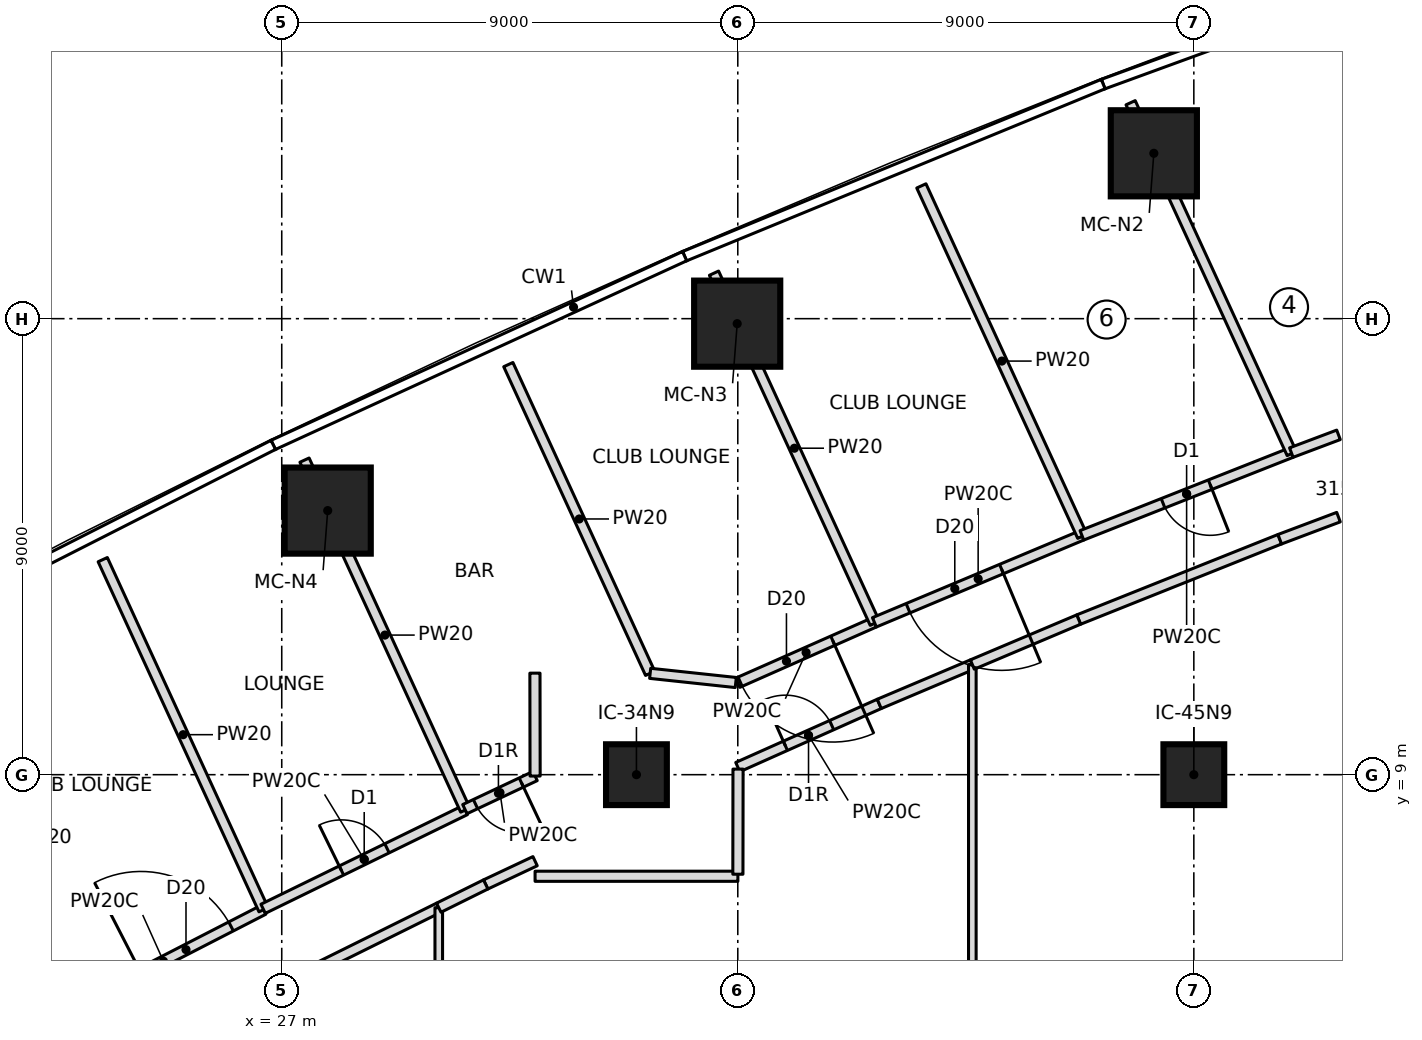
"""IFC4 building model, lengths in metres.
Left out: names, types, materials, properties, quantities, classifications, styles, units other than length and angle.
Written with IfcOpenShell. Run it as: python <this file> out.ifc"""

import sys

from ifc_helpers import new_model, si_unit, direction, frame, frame_2d, origin, origin_2d, place, context, subcontext, project, spatial, rectangle, extrude, element, fill, save


model = new_model("IFC4")
c1 = context("Model", 3, precision=1e-05, world=origin(), true_north=direction((0.0, 1.0)))
c2 = subcontext(c1, "Body", "Model", "MODEL_VIEW")
j1 = project(units=[si_unit("LENGTHUNIT", "METRE"), si_unit("PLANEANGLEUNIT", "RADIAN")], contexts=[c1])
p1 = place(None, origin())
s1 = spatial("IfcSite", under=j1, at=p1, CompositionType="ELEMENT")
p2 = place(p1, origin())
s2 = spatial("IfcBuilding", under=s1, at=p2, CompositionType="ELEMENT")
p3 = place(p2, frame((0.0, 0.0, 88.45)))
s3 = spatial("IfcBuildingStorey", under=s2, at=p3, CompositionType="ELEMENT", Elevation=88.45)
for number, where, z_axis, x_axis in (
    (1, (44.211, 21.264, 0.0), (0.0, 0.0, 1.0), (1.0, 0.0, 0.0)),
    (2, (35.988, 17.902, 0.0), (0.0, 0.0, 1.0), (1.0, 0.0, 0.0)),
    (3, (27.907, 14.212, 0.0), (0.0, 0.0, 1.0), (1.0, 0.0, 0.0)),
):
    element("IfcColumn", number, at=place(p3, frame(where, z_axis=z_axis, x_axis=x_axis)), inside=s3, PredefinedType="COLUMN", context=c2, shape_type="SweptSolid", body=[
        extrude(rectangle(XDim=1.7, YDim=1.7, at=origin_2d()), origin(), (0.0, 0.0, 1.0), 3.55),
    ])
for number, where, z_axis, x_axis in (
    (4, (34.0, 9.0, 0.0), (0.0, 0.0, 1.0), (1.0, 0.0, 0.0)),
    (5, (45.0, 9.0, 0.0), (0.0, 0.0, 1.0), (1.0, 0.0, 0.0)),
):
    element("IfcColumn", number, at=place(p3, frame(where, z_axis=z_axis, x_axis=x_axis)), inside=s3, PredefinedType="COLUMN", context=c2, shape_type="SweptSolid", body=[
        extrude(rectangle(XDim=1.2, YDim=1.2, at=origin_2d()), origin(), (0.0, 0.0, 1.0), 3.55),
    ])
p4 = place(p3, frame((22.699, 4.284, 0.0), z_axis=(0.0, 0.0, 1.0), x_axis=(-0.417413534969, 0.908716644959, 0.0)))
e6 = element("IfcWall", 6, at=p4, inside=s3, PredefinedType="PARTITIONING", context=c2, shape_type="SweptSolid", body=[
    extrude(rectangle(XDim=7.609, YDim=0.2, at=frame_2d((3.805, 0.0))), origin(), (0.0, 0.0, 1.0), 3.25),
])
p5 = place(p3, frame((22.69, 4.302, 0.0), z_axis=(0.0, 0.0, 1.0), x_axis=(0.889236075961, 0.457448577667, 0.0)))
e7 = element("IfcWall", 7, at=p5, inside=s3, PredefinedType="PARTITIONING", context=c2, shape_type="SweptSolid", body=[
    extrude(rectangle(XDim=4.443, YDim=0.2, at=frame_2d((2.222, 0.0))), origin(), (0.0, 0.0, 1.0), 3.25),
])
p6 = place(p5, frame((1.721, 0.0, 0.0)))
e8 = element("IfcOpeningElement", 8, at=p6, cuts=e7, PredefinedType="OPENING", context=c2, shape_type="SweptSolid", body=[
    extrude(rectangle(XDim=2.0, YDim=2.4, at=frame_2d((1.0, 1.2))), frame((0.0, 0.11, 0.0), z_axis=(0.0, -1.0, 0.0), x_axis=(1.0, 0.0, 0.0)), (0.0, 0.0, 1.0), 0.22),
])
p7 = place(p3, frame((26.641, 6.335, 0.0), z_axis=(0.0, 0.0, 1.0), x_axis=(-0.417455028008, 0.908697584233, 0.0)))
e9 = element("IfcWall", 9, at=p7, inside=s3, PredefinedType="PARTITIONING", context=c2, shape_type="SweptSolid", body=[
    extrude(rectangle(XDim=7.603, YDim=0.2, at=frame_2d((3.802, 0.0))), origin(), (0.0, 0.0, 1.0), 3.25),
])
p8 = place(p3, frame((26.633, 6.353, 0.0), z_axis=(0.0, 0.0, 1.0), x_axis=(0.898502457097, 0.438968489291, 0.0)))
e10 = element("IfcWall", 10, at=p8, inside=s3, PredefinedType="PARTITIONING", context=c2, shape_type="SweptSolid", body=[
    extrude(rectangle(XDim=4.44, YDim=0.2, at=frame_2d((2.22, 0.0))), origin(), (0.0, 0.0, 1.0), 3.25),
])
p9 = place(p8, frame((1.72, 0.0, 0.0)))
e11 = element("IfcOpeningElement", 11, at=p9, cuts=e10, PredefinedType="OPENING", context=c2, shape_type="SweptSolid", body=[
    extrude(rectangle(XDim=1.0, YDim=2.1, at=frame_2d((0.5, 1.05))), frame((0.0, 0.11, 0.0), z_axis=(0.0, -1.0, 0.0), x_axis=(1.0, 0.0, 0.0)), (0.0, 0.0, 1.0), 0.22),
])
p10 = place(p3, frame((30.622, 8.302, 0.0), z_axis=(0.0, 0.0, 1.0), x_axis=(-0.417429919618, 0.90870911859, 0.0)))
e12 = element("IfcWall", 12, at=p10, inside=s3, PredefinedType="PARTITIONING", context=c2, shape_type="SweptSolid", body=[
    extrude(rectangle(XDim=7.6, YDim=0.2, at=frame_2d((3.8, 0.0))), origin(), (0.0, 0.0, 1.0), 3.25),
])
p11 = place(p3, frame((32.0, 8.973, 0.0), z_axis=(0.0, 0.0, 1.0), x_axis=(-0.904695891996, -0.42605791039, 0.0)))
e13 = element("IfcWall", 13, at=p11, inside=s3, PredefinedType="PARTITIONING", context=c2, shape_type="SweptSolid", body=[
    extrude(rectangle(XDim=1.532, YDim=0.2, at=frame_2d((0.766, 0.0))), origin(), (0.0, 0.0, 1.0), 3.25),
])
p12 = place(p11, frame((0.3, 0.0, 0.0)))
e14 = element("IfcOpeningElement", 14, at=p12, cuts=e13, PredefinedType="OPENING", context=c2, shape_type="SweptSolid", body=[
    extrude(rectangle(XDim=1.0, YDim=2.1, at=frame_2d((0.5, 1.05))), frame((0.0, 0.11, 0.0), z_axis=(0.0, -1.0, 0.0), x_axis=(1.0, 0.0, 0.0)), (0.0, 0.0, 1.0), 0.22),
])
p13 = place(p3, frame((34.271, 11.0, 0.0), z_axis=(0.0, 0.0, 1.0), x_axis=(-0.417420546123, 0.908713424394, 0.0)))
e15 = element("IfcWall", 15, at=p13, inside=s3, PredefinedType="PARTITIONING", context=c2, shape_type="SweptSolid", body=[
    extrude(rectangle(XDim=6.706, YDim=0.2, at=frame_2d((3.353, 0.0))), origin(), (0.0, 0.0, 1.0), 3.25),
])
p14 = place(p3, frame((38.696, 12.007, 0.0), z_axis=(0.0, 0.0, 1.0), x_axis=(-0.914578343518, -0.404408770389, 0.0)))
e16 = element("IfcWall", 16, at=p14, inside=s3, PredefinedType="PARTITIONING", context=c2, shape_type="SweptSolid", body=[
    extrude(rectangle(XDim=2.948, YDim=0.2, at=frame_2d((1.474, 0.0))), origin(), (0.0, 0.0, 1.0), 3.25),
])
p15 = place(p14, frame((0.898, 0.0, 0.0)))
e17 = element("IfcOpeningElement", 17, at=p15, cuts=e16, PredefinedType="OPENING", context=c2, shape_type="SweptSolid", body=[
    extrude(rectangle(XDim=2.0, YDim=2.4, at=frame_2d((1.0, 1.2))), frame((0.0, 0.11, 0.0), z_axis=(0.0, -1.0, 0.0), x_axis=(1.0, 0.0, 0.0)), (0.0, 0.0, 1.0), 0.22),
])
p16 = place(p3, frame((38.704, 11.989, 0.0), z_axis=(0.0, 0.0, 1.0), x_axis=(-0.417416334044, 0.908715359215, 0.0)))
e18 = element("IfcWall", 18, at=p16, inside=s3, PredefinedType="PARTITIONING", context=c2, shape_type="SweptSolid", body=[
    extrude(rectangle(XDim=7.604, YDim=0.2, at=frame_2d((3.802, 0.0))), origin(), (0.0, 0.0, 1.0), 3.25),
])
p17 = place(p3, frame((42.791, 13.724, 0.0), z_axis=(0.0, 0.0, 1.0), x_axis=(-0.922230433067, -0.386640696675, 0.0)))
e19 = element("IfcWall", 19, at=p17, inside=s3, PredefinedType="PARTITIONING", context=c2, shape_type="SweptSolid", body=[
    extrude(rectangle(XDim=4.44, YDim=0.2, at=frame_2d((2.22, 0.0))), origin(), (0.0, 0.0, 1.0), 3.25),
])
p18 = place(p17, frame((1.72, 0.0, 0.0)))
e20 = element("IfcOpeningElement", 20, at=p18, cuts=e19, PredefinedType="OPENING", context=c2, shape_type="SweptSolid", body=[
    extrude(rectangle(XDim=2.0, YDim=2.4, at=frame_2d((1.0, 1.2))), frame((0.0, 0.11, 0.0), z_axis=(0.0, -1.0, 0.0), x_axis=(1.0, 0.0, 0.0)), (0.0, 0.0, 1.0), 0.22),
])
p19 = place(p3, frame((42.799, 13.705, 0.0), z_axis=(0.0, 0.0, 1.0), x_axis=(-0.417427858403, 0.908710065438, 0.0)))
e21 = element("IfcWall", 21, at=p19, inside=s3, PredefinedType="PARTITIONING", context=c2, shape_type="SweptSolid", body=[
    extrude(rectangle(XDim=7.61, YDim=0.2, at=frame_2d((3.805, 0.0))), origin(), (0.0, 0.0, 1.0), 3.25),
])
p20 = place(p3, frame((46.924, 15.357, 0.0), z_axis=(0.0, 0.0, 1.0), x_axis=(-0.930040633249, -0.367456692014, 0.0)))
e22 = element("IfcWall", 22, at=p20, inside=s3, PredefinedType="PARTITIONING", context=c2, shape_type="SweptSolid", body=[
    extrude(rectangle(XDim=4.444, YDim=0.2, at=frame_2d((2.222, 0.0))), origin(), (0.0, 0.0, 1.0), 3.25),
])
p21 = place(p20, frame((1.722, 0.0, 0.0)))
e23 = element("IfcOpeningElement", 23, at=p21, cuts=e22, PredefinedType="OPENING", context=c2, shape_type="SweptSolid", body=[
    extrude(rectangle(XDim=1.0, YDim=2.1, at=frame_2d((0.5, 1.05))), frame((0.0, 0.11, 0.0), z_axis=(0.0, -1.0, 0.0), x_axis=(1.0, 0.0, 0.0)), (0.0, 0.0, 1.0), 0.22),
])
p22 = place(p3, frame((46.933, 15.339, 0.0), z_axis=(0.0, 0.0, 1.0), x_axis=(-0.417437957167, 0.908705426371, 0.0)))
e24 = element("IfcWall", 24, at=p22, inside=s3, PredefinedType="PARTITIONING", context=c2, shape_type="SweptSolid", body=[
    extrude(rectangle(XDim=7.619, YDim=0.2, at=frame_2d((3.81, 0.0))), origin(), (0.0, 0.0, 1.0), 3.25),
])
p23 = place(p3, frame((27.196, 4.936, 0.0), z_axis=(0.0, 0.0, 1.0), x_axis=(0.895974251126, 0.444106002345, 0.0)))
e25 = element("IfcWall", 25, at=p23, inside=s3, PredefinedType="PARTITIONING", context=c2, shape_type="SweptSolid", body=[
    extrude(rectangle(XDim=3.24, YDim=0.2, at=frame_2d((1.62, 0.0))), origin(), (0.0, 0.0, 1.0), 3.25),
])
p24 = place(p3, frame((30.099, -6.375, 0.0), z_axis=(0.0, 0.0, 1.0), x_axis=(0.0, 1.0, 0.0)))
e26 = element("IfcWall", 26, at=p24, inside=s3, PredefinedType="PARTITIONING", context=c2, shape_type="SweptSolid", body=[
    extrude(rectangle(XDim=12.749, YDim=0.15, at=frame_2d((6.375, 0.0))), origin(), (0.0, 0.0, 1.0), 3.25),
])
p25 = place(p3, frame((36.0, 9.15, 0.0), z_axis=(0.0, 0.0, 1.0), x_axis=(0.913029587861, 0.407893333716, 0.0)))
e27 = element("IfcWall", 27, at=p25, inside=s3, PredefinedType="PARTITIONING", context=c2, shape_type="SweptSolid", body=[
    extrude(rectangle(XDim=3.058, YDim=0.2, at=frame_2d((1.529, 0.0))), origin(), (0.0, 0.0, 1.0), 3.25),
])
p26 = place(p25, frame((1.029, 0.0, 0.0)))
e28 = element("IfcOpeningElement", 28, at=p26, cuts=e27, PredefinedType="OPENING", context=c2, shape_type="SweptSolid", body=[
    extrude(rectangle(XDim=1.0, YDim=2.1, at=frame_2d((0.5, 1.05))), frame((0.0, 0.11, 0.0), z_axis=(0.0, -1.0, 0.0), x_axis=(1.0, 0.0, 0.0)), (0.0, 0.0, 1.0), 0.22),
])
p27 = place(p3, frame((31.025, 6.833, 0.0), z_axis=(0.0, 0.0, 1.0), x_axis=(0.904690325494, 0.426069730159, 0.0)))
e29 = element("IfcWall", 29, at=p27, inside=s3, PredefinedType="PARTITIONING", context=c2, shape_type="SweptSolid", body=[
    extrude(rectangle(XDim=1.078, YDim=0.2, at=frame_2d((0.539, 0.0))), origin(), (0.0, 0.0, 1.0), 3.25),
])
p28 = place(p3, frame((38.792, 10.397, 0.0), z_axis=(0.0, 0.0, 1.0), x_axis=(0.92104665064, 0.38945226581, 0.0)))
e30 = element("IfcWall", 30, at=p28, inside=s3, PredefinedType="PARTITIONING", context=c2, shape_type="SweptSolid", body=[
    extrude(rectangle(XDim=1.994, YDim=0.2, at=frame_2d((0.997, 0.0))), origin(), (0.0, 0.0, 1.0), 3.25),
])
p29 = place(p3, frame((30.099, 6.375, 0.0), z_axis=(0.0, 0.0, 1.0), x_axis=(0.89598080504, 0.44409277972, 0.0)))
e31 = element("IfcWall", 31, at=p29, inside=s3, PredefinedType="PARTITIONING", context=c2, shape_type="SweptSolid", body=[
    extrude(rectangle(XDim=1.033, YDim=0.2, at=frame_2d((0.517, 0.0))), origin(), (0.0, 0.0, 1.0), 3.25),
])
p30 = place(p3, frame((40.629, -11.174, 0.0), z_axis=(0.0, 0.0, 1.0), x_axis=(0.0, 1.0, 0.0)))
e32 = element("IfcWall", 32, at=p30, inside=s3, PredefinedType="PARTITIONING", context=c2, shape_type="SweptSolid", body=[
    extrude(rectangle(XDim=22.348, YDim=0.15, at=frame_2d((11.174, 0.0))), origin(), (0.0, 0.0, 1.0), 3.25),
])
p31 = place(p3, frame((42.728, 12.062, 0.0), z_axis=(0.0, 0.0, 1.0), x_axis=(0.928638161177, 0.370986745864, 0.0)))
e33 = element("IfcWall", 33, at=p31, inside=s3, PredefinedType="PARTITIONING", context=c2, shape_type="SweptSolid", body=[
    extrude(rectangle(XDim=4.273, YDim=0.2, at=frame_2d((2.136, 0.0))), origin(), (0.0, 0.0, 1.0), 3.25),
])
p32 = place(p3, frame((40.629, 11.174, 0.0), z_axis=(0.0, 0.0, 1.0), x_axis=(0.921029334809, 0.38949321486, 0.0)))
e34 = element("IfcWall", 34, at=p32, inside=s3, PredefinedType="PARTITIONING", context=c2, shape_type="SweptSolid", body=[
    extrude(rectangle(XDim=2.279, YDim=0.2, at=frame_2d((1.14, 0.0))), origin(), (0.0, 0.0, 1.0), 3.25),
])
p33 = place(p3, frame((47.855, 15.707, 0.0), z_axis=(0.0, 0.0, 1.0), x_axis=(-0.935803526171, -0.35252199989, 0.0)))
e35 = element("IfcWall", 35, at=p33, inside=s3, PredefinedType="PARTITIONING", context=c2, shape_type="SweptSolid", body=[
    extrude(rectangle(XDim=0.995, YDim=0.2, at=frame_2d((0.497, 0.0))), origin(), (0.0, 0.0, 1.0), 3.25),
])
p34 = place(p3, frame((46.696, 13.647, 0.0), z_axis=(0.0, 0.0, 1.0), x_axis=(0.935907269358, 0.352246480696, 0.0)))
e36 = element("IfcWall", 36, at=p34, inside=s3, PredefinedType="PARTITIONING", context=c2, shape_type="SweptSolid", body=[
    extrude(rectangle(XDim=1.239, YDim=0.2, at=frame_2d((0.619, 0.0))), origin(), (0.0, 0.0, 1.0), 3.25),
])
p35 = place(p3, frame((32.0, 6.995, 0.0), z_axis=(0.0, 0.0, 1.0), x_axis=(0.99999999814, 6.0997926e-05, 0.0)))
e37 = element("IfcWall", 37, at=p35, inside=s3, PredefinedType="PARTITIONING", context=c2, shape_type="SweptSolid", body=[
    extrude(rectangle(XDim=4.002, YDim=0.2, at=frame_2d((2.001, 0.0))), origin(), (0.0, 0.0, 1.0), 3.25),
])
p36 = place(p3, frame((36.002, 7.035, 0.0), z_axis=(0.0, 0.0, 1.0), x_axis=(0.001412095556, 0.999999002993, 0.0)))
e38 = element("IfcWall", 38, at=p36, inside=s3, PredefinedType="PARTITIONING", context=c2, shape_type="SweptSolid", body=[
    extrude(rectangle(XDim=2.075, YDim=0.2, at=frame_2d((1.037, 0.0))), origin(), (0.0, 0.0, 1.0), 3.25),
])
p37 = place(p3, frame((31.997, 11.004, 0.0), z_axis=(0.0, 0.0, 1.0), x_axis=(0.001562685915, -0.999998779006, 0.0)))
e39 = element("IfcWall", 39, at=p37, inside=s3, PredefinedType="PARTITIONING", context=c2, shape_type="SweptSolid", body=[
    extrude(rectangle(XDim=2.031, YDim=0.2, at=frame_2d((1.016, 0.0))), origin(), (0.0, 0.0, 1.0), 3.25),
])
p38 = place(p3, frame((35.96, 10.819, 0.0), z_axis=(0.0, 0.0, 1.0), x_axis=(-0.994302086265, 0.106599067766, 0.0)))
e40 = element("IfcWall", 40, at=p38, inside=s3, PredefinedType="PARTITIONING", context=c2, shape_type="SweptSolid", body=[
    extrude(rectangle(XDim=1.699, YDim=0.2, at=frame_2d((0.85, 0.0))), origin(), (0.0, 0.0, 1.0), 3.25),
])
p39 = place(p6, origin())
e41 = element("IfcDoor", 41, at=p39, inside=s3, OperationType="DOUBLE_DOOR_SINGLE_SWING", PredefinedType="DOOR", context=c2, shape_type="SweptSolid", body=[
    extrude(rectangle(XDim=2.0, YDim=2.4, at=frame_2d((1.0, 1.2))), frame((0.0, 0.025, 0.0), z_axis=(0.0, -1.0, 0.0), x_axis=(1.0, 0.0, 0.0)), (0.0, 0.0, 1.0), 0.05),
])
fill(e8, e41)
p40 = place(p9, origin())
e42 = element("IfcDoor", 42, at=p40, inside=s3, OperationType="SINGLE_SWING_LEFT", PredefinedType="DOOR", context=c2, shape_type="SweptSolid", body=[
    extrude(rectangle(XDim=1.0, YDim=2.1, at=frame_2d((0.5, 1.05))), frame((0.0, 0.025, 0.0), z_axis=(0.0, -1.0, 0.0), x_axis=(1.0, 0.0, 0.0)), (0.0, 0.0, 1.0), 0.05),
])
fill(e11, e42)
p41 = place(p12, origin())
e43 = element("IfcDoor", 43, at=p41, inside=s3, OperationType="SINGLE_SWING_RIGHT", PredefinedType="DOOR", context=c2, shape_type="SweptSolid", body=[
    extrude(rectangle(XDim=1.0, YDim=2.1, at=frame_2d((0.5, 1.05))), frame((0.0, 0.025, 0.0), z_axis=(0.0, -1.0, 0.0), x_axis=(1.0, 0.0, 0.0)), (0.0, 0.0, 1.0), 0.05),
])
fill(e14, e43)
p42 = place(p15, origin())
e44 = element("IfcDoor", 44, at=p42, inside=s3, OperationType="DOUBLE_DOOR_SINGLE_SWING", PredefinedType="DOOR", context=c2, shape_type="SweptSolid", body=[
    extrude(rectangle(XDim=2.0, YDim=2.4, at=frame_2d((1.0, 1.2))), frame((0.0, 0.025, 0.0), z_axis=(0.0, -1.0, 0.0), x_axis=(1.0, 0.0, 0.0)), (0.0, 0.0, 1.0), 0.05),
])
fill(e17, e44)
p43 = place(p18, origin())
e45 = element("IfcDoor", 45, at=p43, inside=s3, OperationType="DOUBLE_DOOR_SINGLE_SWING", PredefinedType="DOOR", context=c2, shape_type="SweptSolid", body=[
    extrude(rectangle(XDim=2.0, YDim=2.4, at=frame_2d((1.0, 1.2))), frame((0.0, 0.025, 0.0), z_axis=(0.0, -1.0, 0.0), x_axis=(1.0, 0.0, 0.0)), (0.0, 0.0, 1.0), 0.05),
])
fill(e20, e45)
p44 = place(p21, origin())
e46 = element("IfcDoor", 46, at=p44, inside=s3, OperationType="SINGLE_SWING_LEFT", PredefinedType="DOOR", context=c2, shape_type="SweptSolid", body=[
    extrude(rectangle(XDim=1.0, YDim=2.1, at=frame_2d((0.5, 1.05))), frame((0.0, 0.025, 0.0), z_axis=(0.0, -1.0, 0.0), x_axis=(1.0, 0.0, 0.0)), (0.0, 0.0, 1.0), 0.05),
])
fill(e23, e46)
p45 = place(p26, origin())
e47 = element("IfcDoor", 47, at=p45, inside=s3, OperationType="SINGLE_SWING_RIGHT", PredefinedType="DOOR", context=c2, shape_type="SweptSolid", body=[
    extrude(rectangle(XDim=1.0, YDim=2.1, at=frame_2d((0.5, 1.05))), frame((0.0, 0.025, 0.0), z_axis=(0.0, -1.0, 0.0), x_axis=(1.0, 0.0, 0.0)), (0.0, 0.0, 1.0), 0.05),
])
fill(e28, e47)
save(model, sys.argv[1])
